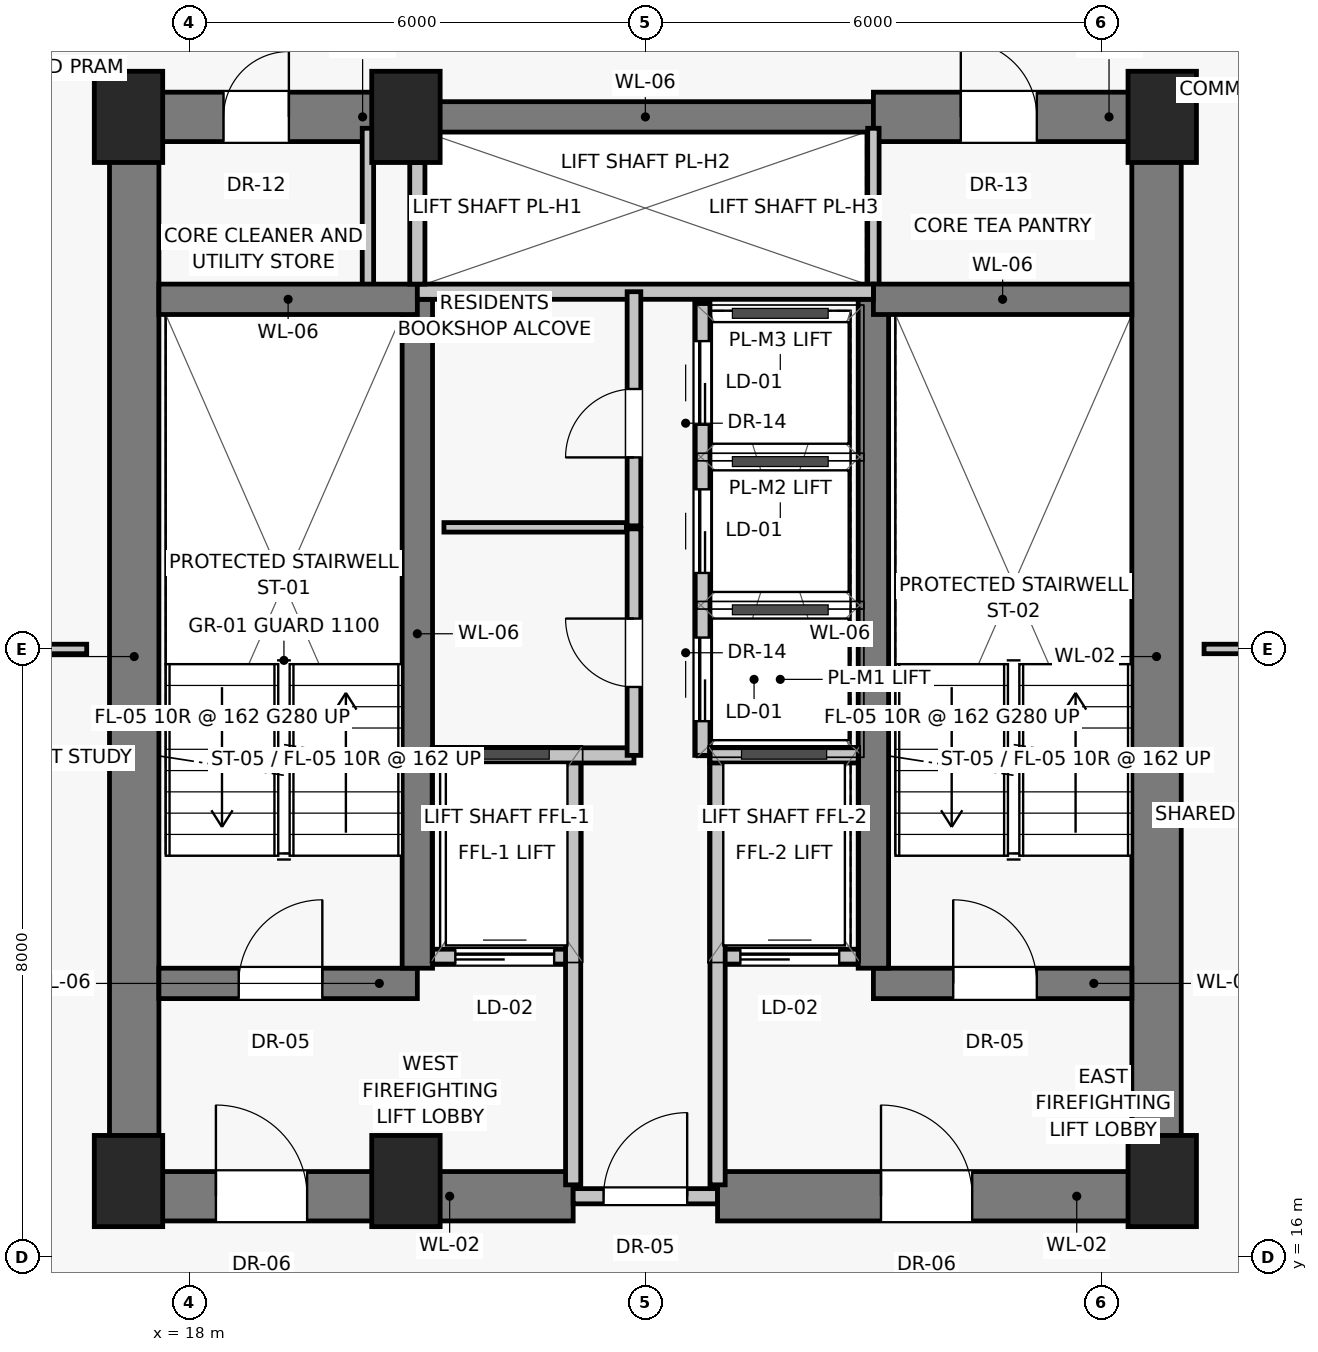
"""IFC4 building model, lengths in metres.
Left out: names, types, materials, properties, quantities, classifications, styles, units other than length and angle.
Written with IfcOpenShell. Run it as: python <this file> out.ifc"""

import sys

from ifc_helpers import new_model, si_unit, direction, frame, frame_2d, origin, origin_2d, place, context, subcontext, project, spatial, rectangle, extrude, source, transform, mapped, element, fill, save


model = new_model("IFC4")
c1 = context("Model", 3, precision=1e-05, world=origin(), true_north=direction((0.0, 1.0)))
c2 = subcontext(c1, "Body", "Model", "MODEL_VIEW")
j1 = project(units=[si_unit("LENGTHUNIT", "METRE"), si_unit("PLANEANGLEUNIT", "RADIAN")], contexts=[c1])
p1 = place(None, origin())
s1 = spatial("IfcSite", under=j1, at=p1, CompositionType="ELEMENT")
p2 = place(p1, origin())
s2 = spatial("IfcBuilding", under=s1, at=p2, CompositionType="ELEMENT")
p3 = place(p2, frame((0.0, 0.0, 119.75)))
s3 = spatial("IfcBuildingStorey", under=s2, at=p3, CompositionType="ELEMENT", Elevation=119.75)
for number, where, z_axis, x_axis in (
    (1, (17.2, 17.0, 0.0), (0.0, 0.0, 1.0), (1.0, 0.0, 0.0)),
    (2, (20.85, 17.0, 0.0), (0.0, 0.0, 1.0), (1.0, 0.0, 0.0)),
    (3, (30.8, 17.0, 0.0), (0.0, 0.0, 1.0), (1.0, 0.0, 0.0)),
    (4, (17.2, 31.0, 0.0), (0.0, 0.0, 1.0), (1.0, 0.0, 0.0)),
    (5, (20.85, 31.0, 0.0), (0.0, 0.0, 1.0), (1.0, 0.0, 0.0)),
    (6, (30.8, 31.0, 0.0), (0.0, 0.0, 1.0), (1.0, 0.0, 0.0)),
):
    element("IfcColumn", number, at=place(p3, frame(where, z_axis=z_axis, x_axis=x_axis)), inside=s3, PredefinedType="PILASTER", context=c2, shape_type="SweptSolid", body=[
        extrude(rectangle(XDim=0.9, YDim=1.2, at=origin_2d()), origin(), (0.0, 0.0, 1.0), 3.25),
    ])
for number, where, z_axis, x_axis in (
    (7, (17.275, 16.8, 0.0), (0.0, 0.0, 1.0), (0.0, 1.0, 0.0)),
    (8, (30.725, 16.8, 0.0), (0.0, 0.0, 1.0), (0.0, 1.0, 0.0)),
):
    element("IfcWall", number, at=place(p3, frame(where, z_axis=z_axis, x_axis=x_axis)), inside=s3, PredefinedType="SHEAR", context=c2, shape_type="SweptSolid", body=[
        extrude(rectangle(XDim=14.2, YDim=0.65, at=frame_2d((7.1, 0.0))), origin(), (0.0, 0.0, 1.0), 3.0),
    ])
p4 = place(p3, frame((17.2, 16.8, 0.0), z_axis=(0.0, 0.0, 1.0), x_axis=(1.0, 0.0, 0.0)))
e9 = element("IfcWall", 9, at=p4, inside=s3, PredefinedType="SHEAR", context=c2, shape_type="SweptSolid", body=[
    extrude(rectangle(XDim=5.85, YDim=0.65, at=frame_2d((2.925, 0.0))), origin(), (0.0, 0.0, 1.0), 3.0),
])
p5 = place(p4, frame((1.15, 0.0, 0.0)))
e10 = element("IfcOpeningElement", 10, at=p5, cuts=e9, PredefinedType="OPENING", context=c2, shape_type="SweptSolid", body=[
    extrude(rectangle(XDim=1.2, YDim=2.03, at=frame_2d((0.6, 1.015))), frame((0.0, 0.335, 0.0), z_axis=(0.0, -1.0, 0.0), x_axis=(1.0, 0.0, 0.0)), (0.0, 0.0, 1.0), 0.67),
])
p6 = place(p3, frame((23.05, 16.8, 0.0), z_axis=(0.0, 0.0, 1.0), x_axis=(1.0, 0.0, 0.0)))
e11 = element("IfcWall", 11, at=p6, inside=s3, PredefinedType="SOLIDWALL", context=c2, shape_type="SweptSolid", body=[
    extrude(rectangle(XDim=1.9, YDim=0.2, at=frame_2d((0.95, 0.0))), origin(), (0.0, 0.0, 1.0), 2.15),
])
p7 = place(p6, frame((0.4, 0.0, 0.0)))
e12 = element("IfcOpeningElement", 12, at=p7, cuts=e11, PredefinedType="OPENING", context=c2, shape_type="SweptSolid", body=[
    extrude(rectangle(XDim=1.1, YDim=2.03, at=frame_2d((0.55, 1.015))), frame((0.0, 0.11, 0.0), z_axis=(0.0, -1.0, 0.0), x_axis=(1.0, 0.0, 0.0)), (0.0, 0.0, 1.0), 0.22),
])
p8 = place(p3, frame((24.95, 16.8, 0.0), z_axis=(0.0, 0.0, 1.0), x_axis=(1.0, 0.0, 0.0)))
e13 = element("IfcWall", 13, at=p8, inside=s3, PredefinedType="SHEAR", context=c2, shape_type="SweptSolid", body=[
    extrude(rectangle(XDim=5.85, YDim=0.65, at=frame_2d((2.925, 0.0))), origin(), (0.0, 0.0, 1.0), 3.0),
])
p9 = place(p8, frame((2.15, 0.0, 0.0)))
e14 = element("IfcOpeningElement", 14, at=p9, cuts=e13, PredefinedType="OPENING", context=c2, shape_type="SweptSolid", body=[
    extrude(rectangle(XDim=1.2, YDim=2.03, at=frame_2d((0.6, 1.015))), frame((0.0, 0.335, 0.0), z_axis=(0.0, -1.0, 0.0), x_axis=(1.0, 0.0, 0.0)), (0.0, 0.0, 1.0), 0.67),
])
p10 = place(p3, frame((17.2, 31.0, 0.0), z_axis=(0.0, 0.0, 1.0), x_axis=(1.0, 0.0, 0.0)))
e15 = element("IfcWall", 15, at=p10, inside=s3, PredefinedType="SHEAR", context=c2, shape_type="SweptSolid", body=[
    extrude(rectangle(XDim=3.8, YDim=0.65, at=frame_2d((1.9, 0.0))), origin(), (0.0, 0.0, 1.0), 3.0),
])
p11 = place(p10, frame((1.25, 0.0, 0.0)))
e16 = element("IfcOpeningElement", 16, at=p11, cuts=e15, PredefinedType="OPENING", context=c2, shape_type="SweptSolid", body=[
    extrude(rectangle(XDim=0.86, YDim=2.01, at=frame_2d((0.43, 1.005))), frame((0.0, 0.335, 0.0), z_axis=(0.0, -1.0, 0.0), x_axis=(1.0, 0.0, 0.0)), (0.0, 0.0, 1.0), 0.67),
])
p12 = place(p3, frame((21.0, 31.0, 0.0), z_axis=(0.0, 0.0, 1.0), x_axis=(1.0, 0.0, 0.0)))
e17 = element("IfcWall", 17, at=p12, inside=s3, PredefinedType="SHEAR", context=c2, shape_type="SweptSolid", body=[
    extrude(rectangle(XDim=6.0, YDim=0.4, at=frame_2d((3.0, 0.0))), origin(), (0.0, 0.0, 1.0), 3.0),
])
p13 = place(p3, frame((27.0, 31.0, 0.0), z_axis=(0.0, 0.0, 1.0), x_axis=(1.0, 0.0, 0.0)))
e18 = element("IfcWall", 18, at=p13, inside=s3, PredefinedType="SHEAR", context=c2, shape_type="SweptSolid", body=[
    extrude(rectangle(XDim=3.8, YDim=0.65, at=frame_2d((1.9, 0.0))), origin(), (0.0, 0.0, 1.0), 3.0),
])
p14 = place(p13, frame((1.15, 0.0, 0.0)))
e19 = element("IfcOpeningElement", 19, at=p14, cuts=e18, PredefinedType="OPENING", context=c2, shape_type="SweptSolid", body=[
    extrude(rectangle(XDim=1.0, YDim=2.01, at=frame_2d((0.5, 1.005))), frame((0.0, 0.335, 0.0), z_axis=(0.0, -1.0, 0.0), x_axis=(1.0, 0.0, 0.0)), (0.0, 0.0, 1.0), 0.67),
])
for number, where, z_axis, x_axis in (
    (20, (20.35, 28.65, 0.0), (0.0, 0.0, 1.0), (0.0, 1.0, 0.0)),
    (21, (27.0, 28.65, 0.0), (0.0, 0.0, 1.0), (0.0, 1.0, 0.0)),
):
    element("IfcWall", number, at=place(p3, frame(where, z_axis=z_axis, x_axis=x_axis)), inside=s3, PredefinedType="PARTITIONING", context=c2, shape_type="SweptSolid", body=[
        extrude(rectangle(XDim=2.2, YDim=0.15, at=frame_2d((1.1, 0.0))), origin(), (0.0, 0.0, 1.0), 3.0),
    ])
p15 = place(p3, frame((17.6, 19.6, 0.0), z_axis=(0.0, 0.0, 1.0), x_axis=(1.0, 0.0, 0.0)))
e22 = element("IfcWall", 22, at=p15, inside=s3, PredefinedType="SHEAR", context=c2, shape_type="SweptSolid", body=[
    extrude(rectangle(XDim=3.4, YDim=0.4, at=frame_2d((1.7, 0.0))), origin(), (0.0, 0.0, 1.0), 3.0),
])
p16 = place(p15, frame((1.05, 0.0, 0.0)))
e23 = element("IfcOpeningElement", 23, at=p16, cuts=e22, PredefinedType="OPENING", context=c2, shape_type="SweptSolid", body=[
    extrude(rectangle(XDim=1.1, YDim=2.03, at=frame_2d((0.55, 1.015))), frame((0.0, 0.21, 0.0), z_axis=(0.0, -1.0, 0.0), x_axis=(1.0, 0.0, 0.0)), (0.0, 0.0, 1.0), 0.42),
])
p17 = place(p3, frame((21.2, 19.95, 0.0), z_axis=(0.0, 0.0, 1.0), x_axis=(1.0, 0.0, 0.0)))
e24 = element("IfcWall", 24, at=p17, inside=s3, PredefinedType="SOLIDWALL", context=c2, shape_type="SweptSolid", body=[
    extrude(rectangle(XDim=1.85, YDim=0.2, at=frame_2d((0.925, 0.0))), origin(), (0.0, 0.0, 1.0), 3.0),
])
p18 = place(p17, frame((0.3, 0.0, 0.0)))
e25 = element("IfcOpeningElement", 25, at=p18, cuts=e24, PredefinedType="OPENING", context=c2, shape_type="SweptSolid", body=[
    extrude(rectangle(XDim=1.3, YDim=2.25, at=frame_2d((0.65, 1.125))), frame((0.0, 0.11, 0.0), z_axis=(0.0, -1.0, 0.0), x_axis=(1.0, 0.0, 0.0)), (0.0, 0.0, 1.0), 0.22),
])
p19 = place(p3, frame((24.95, 19.95, 0.0), z_axis=(0.0, 0.0, 1.0), x_axis=(1.0, 0.0, 0.0)))
e26 = element("IfcWall", 26, at=p19, inside=s3, PredefinedType="SOLIDWALL", context=c2, shape_type="SweptSolid", body=[
    extrude(rectangle(XDim=1.85, YDim=0.2, at=frame_2d((0.925, 0.0))), origin(), (0.0, 0.0, 1.0), 3.0),
])
p20 = place(p19, frame((0.3, 0.0, 0.0)))
e27 = element("IfcOpeningElement", 27, at=p20, cuts=e26, PredefinedType="OPENING", context=c2, shape_type="SweptSolid", body=[
    extrude(rectangle(XDim=1.3, YDim=2.25, at=frame_2d((0.65, 1.125))), frame((0.0, 0.11, 0.0), z_axis=(0.0, -1.0, 0.0), x_axis=(1.0, 0.0, 0.0)), (0.0, 0.0, 1.0), 0.22),
])
p21 = place(p3, frame((27.0, 19.6, 0.0), z_axis=(0.0, 0.0, 1.0), x_axis=(1.0, 0.0, 0.0)))
e28 = element("IfcWall", 28, at=p21, inside=s3, PredefinedType="SHEAR", context=c2, shape_type="SweptSolid", body=[
    extrude(rectangle(XDim=3.4, YDim=0.4, at=frame_2d((1.7, 0.0))), origin(), (0.0, 0.0, 1.0), 3.0),
])
p22 = place(p21, frame((1.05, 0.0, 0.0)))
e29 = element("IfcOpeningElement", 29, at=p22, cuts=e28, PredefinedType="OPENING", context=c2, shape_type="SweptSolid", body=[
    extrude(rectangle(XDim=1.1, YDim=2.03, at=frame_2d((0.55, 1.015))), frame((0.0, 0.21, 0.0), z_axis=(0.0, -1.0, 0.0), x_axis=(1.0, 0.0, 0.0)), (0.0, 0.0, 1.0), 0.42),
])
for number, where, z_axis, x_axis in (
    (30, (21.0, 19.8, 0.0), (0.0, 0.0, 1.0), (0.0, 1.0, 0.0)),
    (31, (27.0, 19.8, 0.0), (0.0, 0.0, 1.0), (0.0, 1.0, 0.0)),
):
    element("IfcWall", number, at=place(p3, frame(where, z_axis=z_axis, x_axis=x_axis)), inside=s3, PredefinedType="SHEAR", context=c2, shape_type="SweptSolid", body=[
        extrude(rectangle(XDim=8.8, YDim=0.4, at=frame_2d((4.4, 0.0))), origin(), (0.0, 0.0, 1.0), 3.0),
    ])
for number, where, z_axis, x_axis in (
    (32, (17.6, 28.6, 0.0), (0.0, 0.0, 1.0), (1.0, 0.0, 0.0)),
    (33, (27.0, 28.6, 0.0), (0.0, 0.0, 1.0), (1.0, 0.0, 0.0)),
):
    element("IfcWall", number, at=place(p3, frame(where, z_axis=z_axis, x_axis=x_axis)), inside=s3, PredefinedType="SHEAR", context=c2, shape_type="SweptSolid", body=[
        extrude(rectangle(XDim=3.4, YDim=0.4, at=frame_2d((1.7, 0.0))), origin(), (0.0, 0.0, 1.0), 3.0),
    ])
for number, where, z_axis, x_axis in (
    (34, (23.05, 16.95, 0.0), (0.0, 0.0, 1.0), (0.0, 1.0, 0.0)),
    (35, (24.95, 16.95, 0.0), (0.0, 0.0, 1.0), (0.0, 1.0, 0.0)),
):
    element("IfcWall", number, at=place(p3, frame(where, z_axis=z_axis, x_axis=x_axis)), inside=s3, PredefinedType="SOLIDWALL", context=c2, shape_type="SweptSolid", body=[
        extrude(rectangle(XDim=5.6, YDim=0.2, at=frame_2d((2.8, 0.0))), origin(), (0.0, 0.0, 1.0), 3.0),
    ])
p23 = place(p3, frame((21.2, 22.6, 0.0), z_axis=(0.0, 0.0, 1.0), x_axis=(1.0, 0.0, 0.0)))
e36 = element("IfcWall", 36, at=p23, inside=s3, PredefinedType="SOLIDWALL", context=c2, shape_type="SweptSolid", body=[
    extrude(rectangle(XDim=2.65, YDim=0.2, at=frame_2d((1.325, 0.0))), origin(), (0.0, 0.0, 1.0), 3.0),
])
p24 = place(p3, frame((24.85, 22.6, 0.0), z_axis=(0.0, 0.0, 1.0), x_axis=(1.0, 0.0, 0.0)))
e37 = element("IfcWall", 37, at=p24, inside=s3, PredefinedType="SOLIDWALL", context=c2, shape_type="SweptSolid", body=[
    extrude(rectangle(XDim=1.95, YDim=0.2, at=frame_2d((0.975, 0.0))), origin(), (0.0, 0.0, 1.0), 3.0),
])
p25 = place(p3, frame((21.0, 28.7, 0.0), z_axis=(0.0, 0.0, 1.0), x_axis=(1.0, 0.0, 0.0)))
e38 = element("IfcWall", 38, at=p25, inside=s3, PredefinedType="SOLIDWALL", context=c2, shape_type="SweptSolid", body=[
    extrude(rectangle(XDim=6.0, YDim=0.2, at=frame_2d((3.0, 0.0))), origin(), (0.0, 0.0, 1.0), 3.0),
])
p26 = place(p3, frame((21.0, 28.8, 0.0), z_axis=(0.0, 0.0, 1.0), x_axis=(0.0, 1.0, 0.0)))
e39 = element("IfcWall", 39, at=p26, inside=s3, PredefinedType="SOLIDWALL", context=c2, shape_type="SweptSolid", body=[
    extrude(rectangle(XDim=1.6, YDim=0.2, at=frame_2d((0.8, 0.0))), origin(), (0.0, 0.0, 1.0), 3.0),
])
p27 = place(p3, frame((23.85, 22.6, 0.0), z_axis=(0.0, 0.0, 1.0), x_axis=(0.0, 1.0, 0.0)))
e40 = element("IfcWall", 40, at=p27, inside=s3, PredefinedType="PARTITIONING", context=c2, shape_type="SweptSolid", body=[
    extrude(rectangle(XDim=2.98, YDim=0.18, at=frame_2d((1.49, 0.0))), origin(), (0.0, 0.0, 1.0), 3.0),
])
p28 = place(p27, frame((0.9, 0.0, 0.0)))
e41 = element("IfcOpeningElement", 41, at=p28, cuts=e40, PredefinedType="OPENING", context=c2, shape_type="SweptSolid", body=[
    extrude(rectangle(XDim=0.9, YDim=2.01, at=frame_2d((0.45, 1.005))), frame((0.0, 0.1, 0.0), z_axis=(0.0, -1.0, 0.0), x_axis=(1.0, 0.0, 0.0)), (0.0, 0.0, 1.0), 0.2),
])
p29 = place(p3, frame((23.85, 25.62, 0.0), z_axis=(0.0, 0.0, 1.0), x_axis=(0.0, 1.0, 0.0)))
e42 = element("IfcWall", 42, at=p29, inside=s3, PredefinedType="PARTITIONING", context=c2, shape_type="SweptSolid", body=[
    extrude(rectangle(XDim=3.08, YDim=0.18, at=frame_2d((1.54, 0.0))), origin(), (0.0, 0.0, 1.0), 3.0),
])
p30 = place(p29, frame((0.9, 0.0, 0.0)))
e43 = element("IfcOpeningElement", 43, at=p30, cuts=e42, PredefinedType="OPENING", context=c2, shape_type="SweptSolid", body=[
    extrude(rectangle(XDim=0.9, YDim=2.01, at=frame_2d((0.45, 1.005))), frame((0.0, 0.1, 0.0), z_axis=(0.0, -1.0, 0.0), x_axis=(1.0, 0.0, 0.0)), (0.0, 0.0, 1.0), 0.2),
])
p31 = place(p3, frame((24.75, 22.6, 0.0), z_axis=(0.0, 0.0, 1.0), x_axis=(0.0, 1.0, 0.0)))
e44 = element("IfcWall", 44, at=p31, inside=s3, PredefinedType="SOLIDWALL", context=c2, shape_type="SweptSolid", body=[
    extrude(rectangle(XDim=5.95, YDim=0.2, at=frame_2d((2.975, 0.0))), origin(), (0.0, 0.0, 1.0), 3.0),
])
p32 = place(p31, frame((0.45, 0.0, 0.0)))
e45 = element("IfcOpeningElement", 45, at=p32, cuts=e44, PredefinedType="OPENING", context=c2, shape_type="SweptSolid", body=[
    extrude(rectangle(XDim=1.1, YDim=2.08, at=frame_2d((0.55, 1.04))), frame((0.0, 0.11, 0.0), z_axis=(0.0, -1.0, 0.0), x_axis=(1.0, 0.0, 0.0)), (0.0, 0.0, 1.0), 0.22),
])
p33 = place(p31, frame((2.4, 0.0, 0.0)))
e46 = element("IfcOpeningElement", 46, at=p33, cuts=e44, PredefinedType="OPENING", context=c2, shape_type="SweptSolid", body=[
    extrude(rectangle(XDim=1.1, YDim=2.08, at=frame_2d((0.55, 1.04))), frame((0.0, 0.11, 0.0), z_axis=(0.0, -1.0, 0.0), x_axis=(1.0, 0.0, 0.0)), (0.0, 0.0, 1.0), 0.22),
])
p34 = place(p31, frame((4.35, 0.0, 0.0)))
e47 = element("IfcOpeningElement", 47, at=p34, cuts=e44, PredefinedType="OPENING", context=c2, shape_type="SweptSolid", body=[
    extrude(rectangle(XDim=1.1, YDim=2.08, at=frame_2d((0.55, 1.04))), frame((0.0, 0.11, 0.0), z_axis=(0.0, -1.0, 0.0), x_axis=(1.0, 0.0, 0.0)), (0.0, 0.0, 1.0), 0.22),
])
p35 = place(p3, frame((21.35, 25.6, 0.0), z_axis=(0.0, 0.0, 1.0), x_axis=(1.0, 0.0, 0.0)))
e48 = element("IfcWall", 48, at=p35, inside=s3, PredefinedType="PARTITIONING", context=c2, shape_type="SweptSolid", body=[
    extrude(rectangle(XDim=2.4, YDim=0.125, at=frame_2d((1.2, 0.0))), origin(), (0.0, 0.0, 1.0), 3.0),
])
for number, where, z_axis, x_axis in (
    (49, (14.55, 24.0, 0.0), (0.0, 0.0, 1.0), (1.0, 0.0, 0.0)),
    (50, (31.35, 24.0, 0.0), (0.0, 0.0, 1.0), (1.0, 0.0, 0.0)),
):
    element("IfcWall", number, at=place(p3, frame(where, z_axis=z_axis, x_axis=x_axis)), inside=s3, PredefinedType="PARTITIONING", context=c2, shape_type="SweptSolid", body=[
        extrude(rectangle(XDim=2.1, YDim=0.125, at=frame_2d((1.05, 0.0))), origin(), (0.0, 0.0, 1.0), 3.0),
    ])
m1 = source(origin(), c2, "Body", "SweptSolid", [
    extrude(rectangle(XDim=1.2, YDim=2.03, at=frame_2d((0.6, 1.015))), frame((0.0, 0.025, 0.0), z_axis=(0.0, -1.0, 0.0), x_axis=(1.0, 0.0, 0.0)), (0.0, 0.0, 1.0), 0.05),
])
p36 = place(p5, origin())
e51 = element("IfcDoor", 51, at=p36, inside=s3, OperationType="SINGLE_SWING_LEFT", PredefinedType="DOOR", context=c2, shape_type="MappedRepresentation", body=[
    mapped(m1, transform((0.0, 0.0, 0.0), scale=1.0)),
])
fill(e10, e51)
m2 = source(origin(), c2, "Body", "SweptSolid", [
    extrude(rectangle(XDim=1.1, YDim=2.03, at=frame_2d((0.55, 1.015))), frame((0.0, 0.025, 0.0), z_axis=(0.0, -1.0, 0.0), x_axis=(1.0, 0.0, 0.0)), (0.0, 0.0, 1.0), 0.05),
])
p37 = place(p7, origin())
e52 = element("IfcDoor", 52, at=p37, inside=s3, OperationType="SINGLE_SWING_RIGHT", PredefinedType="DOOR", context=c2, shape_type="MappedRepresentation", body=[
    mapped(m2, transform((0.0, 0.0, 0.0), scale=1.0)),
])
fill(e12, e52)
p38 = place(p9, origin())
e53 = element("IfcDoor", 53, at=p38, inside=s3, OperationType="SINGLE_SWING_LEFT", PredefinedType="DOOR", context=c2, shape_type="MappedRepresentation", body=[
    mapped(m1, transform((0.0, 0.0, 0.0), scale=1.0)),
])
fill(e14, e53)
m3 = source(origin(), c2, "Body", "SweptSolid", [
    extrude(rectangle(XDim=0.86, YDim=2.01, at=frame_2d((0.43, 1.005))), frame((0.0, 0.025, 0.0), z_axis=(0.0, -1.0, 0.0), x_axis=(1.0, 0.0, 0.0)), (0.0, 0.0, 1.0), 0.05),
])
p39 = place(p11, origin())
e54 = element("IfcDoor", 54, at=p39, inside=s3, OperationType="SINGLE_SWING_RIGHT", PredefinedType="DOOR", context=c2, shape_type="MappedRepresentation", body=[
    mapped(m3, transform((0.0, 0.0, 0.0), scale=1.0)),
])
fill(e16, e54)
m4 = source(origin(), c2, "Body", "SweptSolid", [
    extrude(rectangle(XDim=1.0, YDim=2.01, at=frame_2d((0.5, 1.005))), frame((0.0, 0.025, 0.0), z_axis=(0.0, -1.0, 0.0), x_axis=(1.0, 0.0, 0.0)), (0.0, 0.0, 1.0), 0.05),
])
p40 = place(p14, origin())
e55 = element("IfcDoor", 55, at=p40, inside=s3, OperationType="SINGLE_SWING_LEFT", PredefinedType="DOOR", context=c2, shape_type="MappedRepresentation", body=[
    mapped(m4, transform((0.0, 0.0, 0.0), scale=1.0)),
])
fill(e19, e55)
p41 = place(p16, origin())
e56 = element("IfcDoor", 56, at=p41, inside=s3, OperationType="SINGLE_SWING_RIGHT", PredefinedType="DOOR", context=c2, shape_type="MappedRepresentation", body=[
    mapped(m2, transform((0.0, 0.0, 0.0), scale=1.0)),
])
fill(e23, e56)
m5 = source(origin(), c2, "Body", "SweptSolid", [
    extrude(rectangle(XDim=1.3, YDim=2.25, at=frame_2d((0.65, 1.125))), frame((0.0, 0.025, 0.0), z_axis=(0.0, -1.0, 0.0), x_axis=(1.0, 0.0, 0.0)), (0.0, 0.0, 1.0), 0.05),
])
p42 = place(p18, origin())
e57 = element("IfcDoor", 57, at=p42, inside=s3, OperationType="SLIDING_TO_LEFT", PredefinedType="DOOR", context=c2, shape_type="MappedRepresentation", body=[
    mapped(m5, transform((0.0, 0.0, 0.0), scale=1.0)),
])
fill(e25, e57)
p43 = place(p20, origin())
e58 = element("IfcDoor", 58, at=p43, inside=s3, OperationType="SLIDING_TO_LEFT", PredefinedType="DOOR", context=c2, shape_type="MappedRepresentation", body=[
    mapped(m5, transform((0.0, 0.0, 0.0), scale=1.0)),
])
fill(e27, e58)
p44 = place(p22, origin())
e59 = element("IfcDoor", 59, at=p44, inside=s3, OperationType="SINGLE_SWING_LEFT", PredefinedType="DOOR", context=c2, shape_type="MappedRepresentation", body=[
    mapped(m2, transform((0.0, 0.0, 0.0), scale=1.0)),
])
fill(e29, e59)
m6 = source(origin(), c2, "Body", "SweptSolid", [
    extrude(rectangle(XDim=0.9, YDim=2.01, at=frame_2d((0.45, 1.005))), frame((0.0, 0.025, 0.0), z_axis=(0.0, -1.0, 0.0), x_axis=(1.0, 0.0, 0.0)), (0.0, 0.0, 1.0), 0.05),
])
p45 = place(p28, origin())
e60 = element("IfcDoor", 60, at=p45, inside=s3, OperationType="SINGLE_SWING_RIGHT", PredefinedType="DOOR", context=c2, shape_type="MappedRepresentation", body=[
    mapped(m6, transform((0.0, 0.0, 0.0), scale=1.0)),
])
fill(e41, e60)
p46 = place(p30, origin())
e61 = element("IfcDoor", 61, at=p46, inside=s3, OperationType="SINGLE_SWING_LEFT", PredefinedType="DOOR", context=c2, shape_type="MappedRepresentation", body=[
    mapped(m6, transform((0.0, 0.0, 0.0), scale=1.0)),
])
fill(e43, e61)
m7 = source(origin(), c2, "Body", "SweptSolid", [
    extrude(rectangle(XDim=1.1, YDim=2.08, at=frame_2d((0.55, 1.04))), frame((0.0, 0.025, 0.0), z_axis=(0.0, -1.0, 0.0), x_axis=(1.0, 0.0, 0.0)), (0.0, 0.0, 1.0), 0.05),
])
p47 = place(p32, origin())
e62 = element("IfcDoor", 62, at=p47, inside=s3, OperationType="SLIDING_TO_LEFT", PredefinedType="DOOR", context=c2, shape_type="MappedRepresentation", body=[
    mapped(m7, transform((0.0, 0.0, 0.0), scale=1.0)),
])
fill(e45, e62)
p48 = place(p33, origin())
e63 = element("IfcDoor", 63, at=p48, inside=s3, OperationType="SLIDING_TO_LEFT", PredefinedType="DOOR", context=c2, shape_type="MappedRepresentation", body=[
    mapped(m7, transform((0.0, 0.0, 0.0), scale=1.0)),
])
fill(e46, e63)
p49 = place(p34, origin())
e64 = element("IfcDoor", 64, at=p49, inside=s3, OperationType="SLIDING_TO_LEFT", PredefinedType="DOOR", context=c2, shape_type="MappedRepresentation", body=[
    mapped(m7, transform((0.0, 0.0, 0.0), scale=1.0)),
])
fill(e47, e64)
save(model, sys.argv[1])
